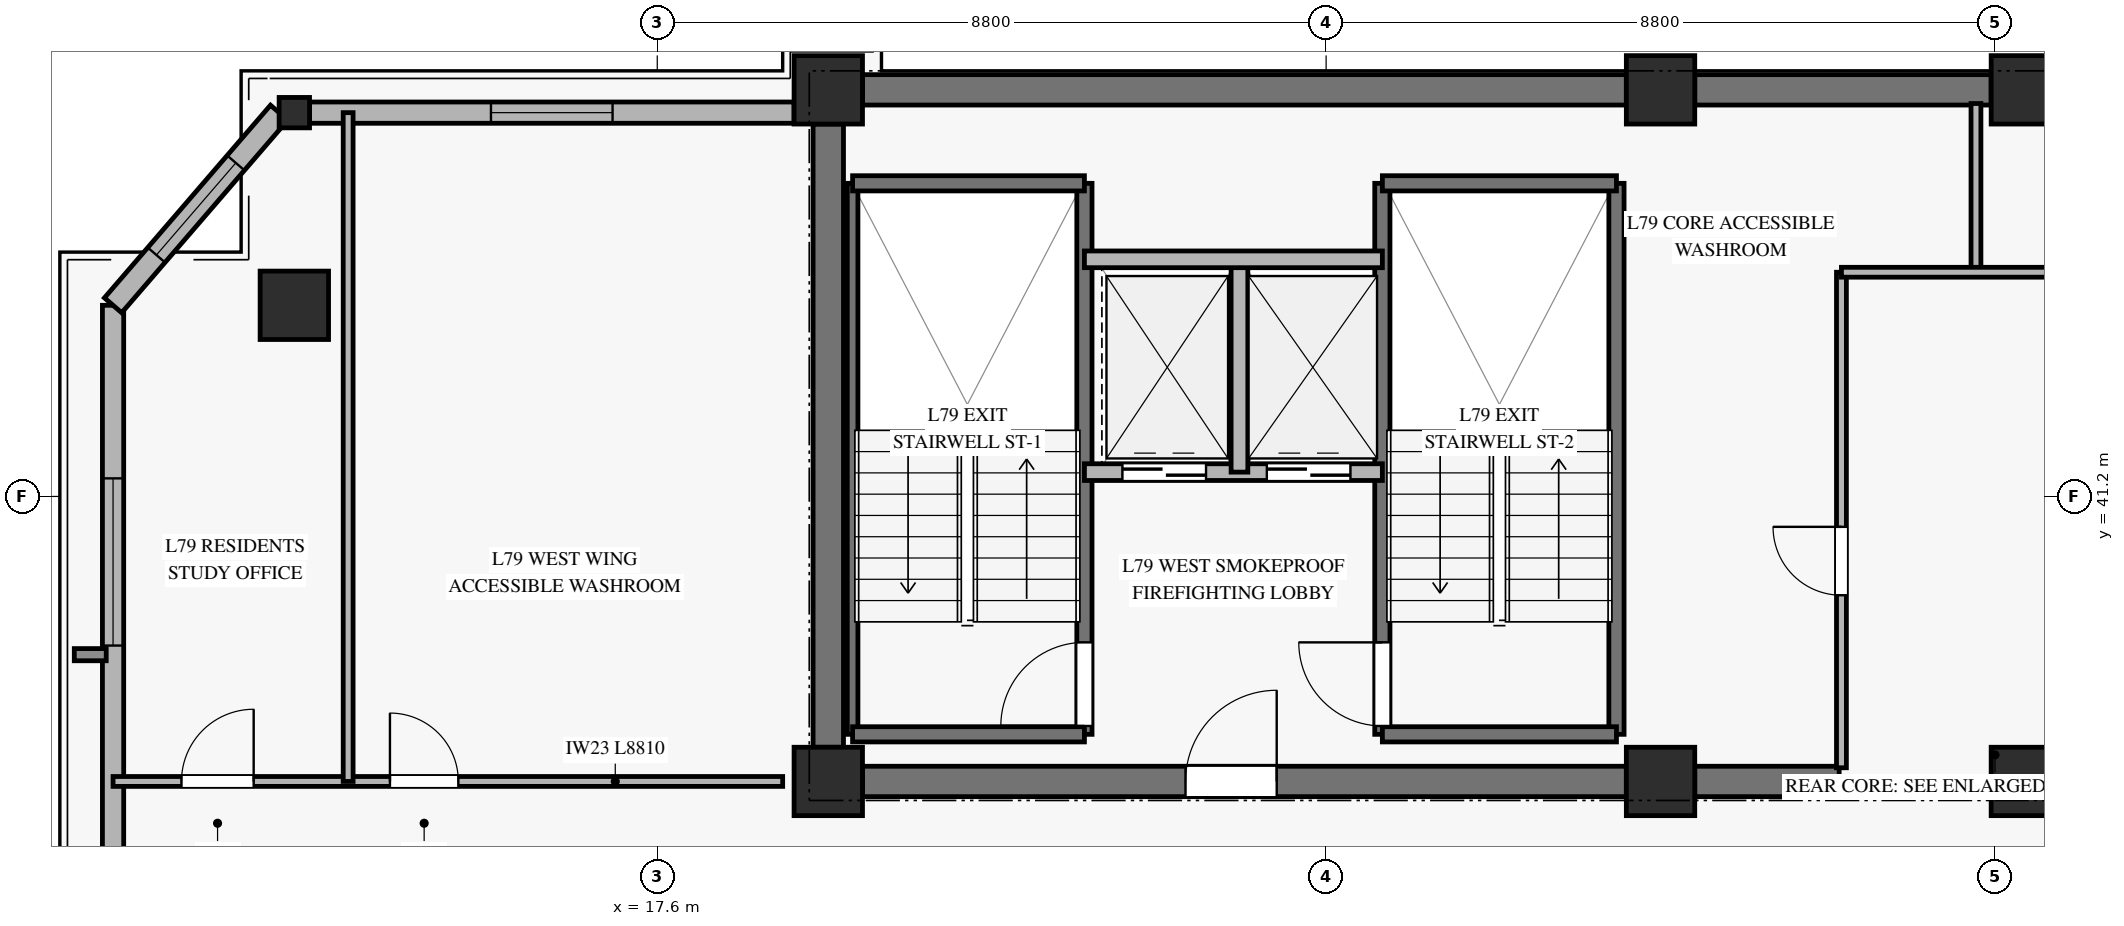
"""IFC4 building model, lengths in metres.
Left out: names, types, materials, properties, quantities, classifications, styles, units other than length and angle.
Written with IfcOpenShell. Run it as: python <this file> out.ifc"""

import sys

from ifc_helpers import new_model, si_unit, direction, frame, frame_2d, origin, origin_2d, place, context, subcontext, project, spatial, rectangle, hollow_rectangle, extrude, source, transform, mapped, element, fill, save


model = new_model("IFC4")
c1 = context("Model", 3, precision=1e-05, world=origin(), true_north=direction((0.0, 1.0)))
c2 = subcontext(c1, "Body", "Model", "MODEL_VIEW")
j1 = project(units=[si_unit("LENGTHUNIT", "METRE"), si_unit("PLANEANGLEUNIT", "RADIAN")], contexts=[c1])
p1 = place(None, origin())
s1 = spatial("IfcSite", under=j1, at=p1, CompositionType="ELEMENT")
p2 = place(p1, origin())
s2 = spatial("IfcBuilding", under=s1, at=p2, CompositionType="ELEMENT")
p3 = place(p2, frame((0.0, 0.0, 307.4)))
s3 = spatial("IfcBuildingStorey", under=s2, at=p3, CompositionType="ELEMENT", Elevation=307.4)
m1 = source(origin(), c2, "Body", "SweptSolid", [
    extrude(rectangle(XDim=0.9, YDim=0.9, at=origin_2d()), origin(), (0.0, 0.0, 1.0), 3.185),
])
for number, where, z_axis, x_axis in (
    (1, (19.85, 37.45, 0.0), (0.0, 0.0, 1.0), (1.0, 0.0, 0.0)),
    (2, (19.85, 46.55, 0.0), (0.0, 0.0, 1.0), (1.0, 0.0, 0.0)),
    (3, (30.8, 37.45, 0.0), (0.0, 0.0, 1.0), (1.0, 0.0, 0.0)),
    (4, (30.8, 46.55, 0.0), (0.0, 0.0, 1.0), (1.0, 0.0, 0.0)),
    (5, (35.6, 37.45, 0.0), (0.0, 0.0, 1.0), (1.0, 0.0, 0.0)),
    (6, (35.6, 46.55, 0.0), (0.0, 0.0, 1.0), (1.0, 0.0, 0.0)),
):
    element("IfcColumn", number, at=place(p3, frame(where, z_axis=z_axis, x_axis=x_axis)), inside=s3, PredefinedType="PILASTER", context=c2, shape_type="MappedRepresentation", body=[
        mapped(m1, transform((0.0, 0.0, 0.0), x_axis=(1.0, 0.0, 0.0), y_axis=(0.0, 1.0, 0.0), z_axis=(0.0, 0.0, 1.0), scale=1.0)),
    ])
p4 = place(p3, frame((20.3, 46.55, 0.0), z_axis=(0.0, 0.0, 1.0), x_axis=(1.0, 0.0, 0.0)))
e7 = element("IfcWall", 7, at=p4, inside=s3, PredefinedType="SHEAR", context=c2, shape_type="SweptSolid", body=[
    extrude(rectangle(XDim=10.05, YDim=0.4, at=frame_2d((5.025, 0.0))), origin(), (0.0, 0.0, 1.0), 3.185),
])
p5 = place(p3, frame((31.25, 46.55, 0.0), z_axis=(0.0, 0.0, 1.0), x_axis=(1.0, 0.0, 0.0)))
e8 = element("IfcWall", 8, at=p5, inside=s3, PredefinedType="SHEAR", context=c2, shape_type="SweptSolid", body=[
    extrude(rectangle(XDim=3.9, YDim=0.4, at=frame_2d((1.95, 0.0))), origin(), (0.0, 0.0, 1.0), 3.185),
])
p6 = place(p3, frame((20.3, 37.45, 0.0), z_axis=(0.0, 0.0, 1.0), x_axis=(1.0, 0.0, 0.0)))
e9 = element("IfcWall", 9, at=p6, inside=s3, PredefinedType="SHEAR", context=c2, shape_type="SweptSolid", body=[
    extrude(rectangle(XDim=10.05, YDim=0.4, at=frame_2d((5.025, 0.0))), origin(), (0.0, 0.0, 1.0), 3.185),
])
p7 = place(p6, frame((4.25, 0.0, 0.0)))
e10 = element("IfcOpeningElement", 10, at=p7, cuts=e9, PredefinedType="OPENING", context=c2, shape_type="SweptSolid", body=[
    extrude(rectangle(XDim=1.2, YDim=2.15, at=frame_2d((0.6, 1.075))), frame((0.0, 0.21, 0.0), z_axis=(0.0, -1.0, 0.0), x_axis=(1.0, 0.0, 0.0)), (0.0, 0.0, 1.0), 0.42),
])
p8 = place(p3, frame((31.25, 37.45, 0.0), z_axis=(0.0, 0.0, 1.0), x_axis=(1.0, 0.0, 0.0)))
e11 = element("IfcWall", 11, at=p8, inside=s3, PredefinedType="SHEAR", context=c2, shape_type="SweptSolid", body=[
    extrude(rectangle(XDim=1.9, YDim=0.4, at=frame_2d((0.95, 0.0))), origin(), (0.0, 0.0, 1.0), 3.185),
])
p9 = place(p3, frame((19.85, 37.9, 0.0), z_axis=(0.0, 0.0, 1.0), x_axis=(0.0, 1.0, 0.0)))
e12 = element("IfcWall", 12, at=p9, inside=s3, PredefinedType="SHEAR", context=c2, shape_type="SweptSolid", body=[
    extrude(rectangle(XDim=8.2, YDim=0.4, at=frame_2d((4.1, 0.0))), origin(), (0.0, 0.0, 1.0), 3.185),
])
m2 = source(origin(), c2, "Body", "SweptSolid", [
    extrude(hollow_rectangle(XDim=0.9, YDim=0.9, WallThickness=0.04, at=origin_2d()), origin(), (0.0, 0.0, 1.0), 3.185),
])
p10 = place(p3, frame((12.825, 43.715, 0.0), z_axis=(0.0, 0.0, 1.0), x_axis=(1.0, 0.0, 0.0)))
e13 = element("IfcColumn", 13, at=p10, inside=s3, PredefinedType="COLUMN", context=c2, shape_type="MappedRepresentation", body=[
    mapped(m2, transform((0.0, 0.0, 0.0), x_axis=(1.0, 0.0, 0.0), y_axis=(0.0, 1.0, 0.0), z_axis=(0.0, 0.0, 1.0), scale=1.0)),
])
m3 = source(origin(), c2, "Body", "SweptSolid", [
    extrude(hollow_rectangle(XDim=0.4, YDim=0.4, WallThickness=0.02, at=origin_2d()), origin(), (0.0, 0.0, 1.0), 3.185),
])
p11 = place(p3, frame((12.825, 46.25, 0.0), z_axis=(0.0, 0.0, 1.0), x_axis=(1.0, 0.0, 0.0)))
e14 = element("IfcColumn", 14, at=p11, inside=s3, PredefinedType="COLUMN", context=c2, shape_type="MappedRepresentation", body=[
    mapped(m3, transform((0.0, 0.0, 0.0), x_axis=(1.0, 0.0, 0.0), y_axis=(0.0, 1.0, 0.0), z_axis=(0.0, 0.0, 1.0), scale=1.0)),
])
p12 = place(p3, frame((10.44, 33.136, 0.0), z_axis=(0.0, 0.0, 1.0), x_axis=(0.0, 1.0, 0.0)))
e15 = element("IfcWall", 15, at=p12, inside=s3, PredefinedType="SOLIDWALL", context=c2, shape_type="SweptSolid", body=[
    extrude(rectangle(XDim=10.579, YDim=0.28, at=frame_2d((5.29, 0.0))), origin(), (0.0, 0.0, 1.0), 2.815),
])
p13 = place(p12, frame((6.102, 0.0, 0.45)))
e16 = element("IfcOpeningElement", 16, at=p13, cuts=e15, PredefinedType="OPENING", context=c2, shape_type="SweptSolid", body=[
    extrude(rectangle(XDim=2.2, YDim=2.1, at=frame_2d((1.1, 1.05))), frame((0.0, 0.15, 0.0), z_axis=(0.0, -1.0, 0.0), x_axis=(1.0, 0.0, 0.0)), (0.0, 0.0, 1.0), 0.3),
])
p14 = place(p3, frame((13.025, 46.25, 0.0), z_axis=(0.0, 0.0, 1.0), x_axis=(1.0, 0.0, 0.0)))
e17 = element("IfcWall", 17, at=p14, inside=s3, PredefinedType="SOLIDWALL", context=c2, shape_type="SweptSolid", body=[
    extrude(rectangle(XDim=6.375, YDim=0.28, at=frame_2d((3.188, 0.0))), origin(), (0.0, 0.0, 1.0), 2.815),
])
p15 = place(p14, frame((2.387, 0.0, 0.45)))
e18 = element("IfcOpeningElement", 18, at=p15, cuts=e17, PredefinedType="OPENING", context=c2, shape_type="SweptSolid", body=[
    extrude(rectangle(XDim=1.6, YDim=2.0, at=frame_2d((0.8, 1.0))), frame((0.0, 0.15, 0.0), z_axis=(0.0, -1.0, 0.0), x_axis=(1.0, 0.0, 0.0)), (0.0, 0.0, 1.0), 0.3),
])
p16 = place(p3, frame((12.625, 46.25, 0.0), z_axis=(0.0, 0.0, 1.0), x_axis=(-0.652903544361, -0.757441061576, 0.0)))
e19 = element("IfcWall", 19, at=p16, inside=s3, PredefinedType="SOLIDWALL", context=c2, shape_type="SweptSolid", body=[
    extrude(rectangle(XDim=3.347, YDim=0.3, at=frame_2d((1.673, 0.0))), origin(), (0.0, 0.0, 1.0), 2.815),
])
p17 = place(p16, frame((0.873, 0.0, 0.45)))
e20 = element("IfcOpeningElement", 20, at=p17, cuts=e19, PredefinedType="OPENING", context=c2, shape_type="SweptSolid", body=[
    extrude(rectangle(XDim=1.6, YDim=2.0, at=frame_2d((0.8, 1.0))), frame((0.0, 0.16, 0.0), z_axis=(0.0, -1.0, 0.0), x_axis=(1.0, 0.0, 0.0)), (0.0, 0.0, 1.0), 0.32),
])
p18 = place(p3, frame((20.17, 38.07, 0.0), z_axis=(0.0, 0.0, 1.0), x_axis=(0.0, 1.0, 0.0)))
e21 = element("IfcWall", 21, at=p18, inside=s3, PredefinedType="SOLIDWALL", context=c2, shape_type="SweptSolid", body=[
    extrude(rectangle(XDim=7.25, YDim=0.14, at=frame_2d((3.625, 0.0))), origin(), (0.0, 0.0, 1.0), 3.4),
])
p19 = place(p3, frame((23.22, 38.07, 0.0), z_axis=(0.0, 0.0, 1.0), x_axis=(0.0, 1.0, 0.0)))
e22 = element("IfcWall", 22, at=p19, inside=s3, PredefinedType="SOLIDWALL", context=c2, shape_type="SweptSolid", body=[
    extrude(rectangle(XDim=7.25, YDim=0.2, at=frame_2d((3.625, 0.0))), origin(), (0.0, 0.0, 1.0), 3.4),
])
p20 = place(p19, frame((0.11, 0.0, 0.0)))
e23 = element("IfcOpeningElement", 23, at=p20, cuts=e22, PredefinedType="OPENING", context=c2, shape_type="SweptSolid", body=[
    extrude(rectangle(XDim=1.1, YDim=2.15, at=frame_2d((0.55, 1.075))), frame((0.0, 0.11, 0.0), z_axis=(0.0, -1.0, 0.0), x_axis=(1.0, 0.0, 0.0)), (0.0, 0.0, 1.0), 0.22),
])
for number, where, z_axis, x_axis in (
    (24, (20.17, 45.32, 0.0), (0.0, 0.0, 1.0), (1.0, 0.0, 0.0)),
    (25, (20.17, 38.07, 0.0), (0.0, 0.0, 1.0), (1.0, 0.0, 0.0)),
):
    element("IfcWall", number, at=place(p3, frame(where, z_axis=z_axis, x_axis=x_axis)), inside=s3, PredefinedType="SOLIDWALL", context=c2, shape_type="SweptSolid", body=[
        extrude(rectangle(XDim=3.05, YDim=0.2, at=frame_2d((1.525, 0.0))), origin(), (0.0, 0.0, 1.0), 3.4),
    ])
p21 = place(p3, frame((27.14, 38.07, 0.0), z_axis=(0.0, 0.0, 1.0), x_axis=(0.0, 1.0, 0.0)))
e26 = element("IfcWall", 26, at=p21, inside=s3, PredefinedType="SOLIDWALL", context=c2, shape_type="SweptSolid", body=[
    extrude(rectangle(XDim=7.25, YDim=0.2, at=frame_2d((3.625, 0.0))), origin(), (0.0, 0.0, 1.0), 3.4),
])
p22 = place(p21, frame((0.11, 0.0, 0.0)))
e27 = element("IfcOpeningElement", 27, at=p22, cuts=e26, PredefinedType="OPENING", context=c2, shape_type="SweptSolid", body=[
    extrude(rectangle(XDim=1.1, YDim=2.15, at=frame_2d((0.55, 1.075))), frame((0.0, 0.11, 0.0), z_axis=(0.0, -1.0, 0.0), x_axis=(1.0, 0.0, 0.0)), (0.0, 0.0, 1.0), 0.22),
])
p23 = place(p3, frame((30.22, 38.07, 0.0), z_axis=(0.0, 0.0, 1.0), x_axis=(0.0, 1.0, 0.0)))
e28 = element("IfcWall", 28, at=p23, inside=s3, PredefinedType="SOLIDWALL", context=c2, shape_type="SweptSolid", body=[
    extrude(rectangle(XDim=7.25, YDim=0.2, at=frame_2d((3.625, 0.0))), origin(), (0.0, 0.0, 1.0), 3.4),
])
for number, where, z_axis, x_axis in (
    (29, (27.14, 45.32, 0.0), (0.0, 0.0, 1.0), (1.0, 0.0, 0.0)),
    (30, (27.14, 38.07, 0.0), (0.0, 0.0, 1.0), (1.0, 0.0, 0.0)),
):
    element("IfcWall", number, at=place(p3, frame(where, z_axis=z_axis, x_axis=x_axis)), inside=s3, PredefinedType="SOLIDWALL", context=c2, shape_type="SweptSolid", body=[
        extrude(rectangle(XDim=3.08, YDim=0.2, at=frame_2d((1.54, 0.0))), origin(), (0.0, 0.0, 1.0), 3.4),
    ])
p24 = place(p3, frame((23.22, 41.52, 0.0), z_axis=(0.0, 0.0, 1.0), x_axis=(1.0, 0.0, 0.0)))
e31 = element("IfcWall", 31, at=p24, inside=s3, PredefinedType="SOLIDWALL", context=c2, shape_type="SweptSolid", body=[
    extrude(rectangle(XDim=3.92, YDim=0.22, at=frame_2d((1.96, 0.0))), origin(), (0.0, 0.0, 1.0), 3.185),
])
p25 = place(p24, frame((0.5, 0.0, 0.0)))
e32 = element("IfcOpeningElement", 32, at=p25, cuts=e31, PredefinedType="OPENING", context=c2, shape_type="SweptSolid", body=[
    extrude(rectangle(XDim=1.1, YDim=2.2, at=frame_2d((0.55, 1.1))), frame((0.0, 0.12, 0.0), z_axis=(0.0, -1.0, 0.0), x_axis=(1.0, 0.0, 0.0)), (0.0, 0.0, 1.0), 0.24),
])
p26 = place(p24, frame((2.4, 0.0, 0.0)))
e33 = element("IfcOpeningElement", 33, at=p26, cuts=e31, PredefinedType="OPENING", context=c2, shape_type="SweptSolid", body=[
    extrude(rectangle(XDim=1.1, YDim=2.2, at=frame_2d((0.55, 1.1))), frame((0.0, 0.12, 0.0), z_axis=(0.0, -1.0, 0.0), x_axis=(1.0, 0.0, 0.0)), (0.0, 0.0, 1.0), 0.24),
])
p27 = place(p3, frame((25.26, 41.52, 0.0), z_axis=(0.0, 0.0, 1.0), x_axis=(0.0, 1.0, 0.0)))
e34 = element("IfcWall", 34, at=p27, inside=s3, PredefinedType="SOLIDWALL", context=c2, shape_type="SweptSolid", body=[
    extrude(rectangle(XDim=2.8, YDim=0.22, at=frame_2d((1.4, 0.0))), origin(), (0.0, 0.0, 1.0), 3.185),
])
p28 = place(p3, frame((23.22, 44.32, 0.0), z_axis=(0.0, 0.0, 1.0), x_axis=(1.0, 0.0, 0.0)))
e35 = element("IfcWall", 35, at=p28, inside=s3, PredefinedType="SOLIDWALL", context=c2, shape_type="SweptSolid", body=[
    extrude(rectangle(XDim=3.92, YDim=0.22, at=frame_2d((1.96, 0.0))), origin(), (0.0, 0.0, 1.0), 3.185),
])
p29 = place(p3, frame((33.18, 37.63, 0.0), z_axis=(0.0, 0.0, 1.0), x_axis=(0.0, 1.0, 0.0)))
e36 = element("IfcWall", 36, at=p29, inside=s3, PredefinedType="PARTITIONING", context=c2, shape_type="SweptSolid", body=[
    extrude(rectangle(XDim=6.52, YDim=0.13, at=frame_2d((3.26, 0.0))), origin(), (0.0, 0.0, 1.0), 2.27),
])
p30 = place(p29, frame((2.27, 0.0, 0.0)))
e37 = element("IfcOpeningElement", 37, at=p30, cuts=e36, PredefinedType="OPENING", context=c2, shape_type="SweptSolid", body=[
    extrude(rectangle(XDim=0.9, YDim=2.1, at=frame_2d((0.45, 1.05))), frame((0.0, 0.075, 0.0), z_axis=(0.0, -1.0, 0.0), x_axis=(1.0, 0.0, 0.0)), (0.0, 0.0, 1.0), 0.15),
])
p31 = place(p3, frame((34.95, 44.15, 0.0), z_axis=(0.0, 0.0, 1.0), x_axis=(0.0, 1.0, 0.0)))
e38 = element("IfcWall", 38, at=p31, inside=s3, PredefinedType="PARTITIONING", context=c2, shape_type="SweptSolid", body=[
    extrude(rectangle(XDim=2.22, YDim=0.13, at=frame_2d((1.11, 0.0))), origin(), (0.0, 0.0, 1.0), 3.185),
])
p32 = place(p3, frame((33.18, 44.15, 0.0), z_axis=(0.0, 0.0, 1.0), x_axis=(1.0, 0.0, 0.0)))
e39 = element("IfcWall", 39, at=p32, inside=s3, PredefinedType="PARTITIONING", context=c2, shape_type="SweptSolid", body=[
    extrude(rectangle(XDim=2.94, YDim=0.13, at=frame_2d((1.47, 0.0))), origin(), (0.0, 0.0, 1.0), 2.47),
])
p33 = place(p3, frame((10.44, 37.45, 0.0), z_axis=(0.0, 0.0, 1.0), x_axis=(1.0, 0.0, 0.0)))
e40 = element("IfcWall", 40, at=p33, inside=s3, PredefinedType="PARTITIONING", context=c2, shape_type="SweptSolid", body=[
    extrude(rectangle(XDim=8.81, YDim=0.13, at=frame_2d((4.405, 0.0))), origin(), (0.0, 0.0, 1.0), 2.82),
])
p34 = place(p33, frame((0.9, 0.0, 0.0)))
e41 = element("IfcOpeningElement", 41, at=p34, cuts=e40, PredefinedType="OPENING", context=c2, shape_type="SweptSolid", body=[
    extrude(rectangle(XDim=0.95, YDim=2.1, at=frame_2d((0.475, 1.05))), frame((0.0, 0.075, 0.0), z_axis=(0.0, -1.0, 0.0), x_axis=(1.0, 0.0, 0.0)), (0.0, 0.0, 1.0), 0.15),
])
p35 = place(p33, frame((3.643, 0.0, 0.0)))
e42 = element("IfcOpeningElement", 42, at=p35, cuts=e40, PredefinedType="OPENING", context=c2, shape_type="SweptSolid", body=[
    extrude(rectangle(XDim=0.9, YDim=2.1, at=frame_2d((0.45, 1.05))), frame((0.0, 0.075, 0.0), z_axis=(0.0, -1.0, 0.0), x_axis=(1.0, 0.0, 0.0)), (0.0, 0.0, 1.0), 0.15),
])
p36 = place(p3, frame((13.533, 37.45, 0.0), z_axis=(0.0, 0.0, 1.0), x_axis=(0.0, 1.0, 0.0)))
e43 = element("IfcWall", 43, at=p36, inside=s3, PredefinedType="PARTITIONING", context=c2, shape_type="SweptSolid", body=[
    extrude(rectangle(XDim=8.8, YDim=0.13, at=frame_2d((4.4, 0.0))), origin(), (0.0, 0.0, 1.0), 3.185),
])
m4 = source(origin(), c2, "Body", "SweptSolid", [
    extrude(rectangle(XDim=2.2, YDim=2.1, at=frame_2d((1.1, 1.05))), frame((0.0, 0.03, 0.0), z_axis=(0.0, -1.0, 0.0), x_axis=(1.0, 0.0, 0.0)), (0.0, 0.0, 1.0), 0.06),
])
p37 = place(p13, origin())
e44 = element("IfcWindow", 44, at=p37, inside=s3, PartitioningType="SINGLE_PANEL", PredefinedType="WINDOW", context=c2, shape_type="MappedRepresentation", body=[
    mapped(m4, transform((0.0, 0.0, 0.0), x_axis=(1.0, 0.0, 0.0), y_axis=(0.0, 1.0, 0.0), z_axis=(0.0, 0.0, 1.0), scale=1.0)),
])
fill(e16, e44)
m5 = source(origin(), c2, "Body", "SweptSolid", [
    extrude(rectangle(XDim=1.6, YDim=2.0, at=frame_2d((0.8, 1.0))), frame((0.0, 0.03, 0.0), z_axis=(0.0, -1.0, 0.0), x_axis=(1.0, 0.0, 0.0)), (0.0, 0.0, 1.0), 0.06),
])
p38 = place(p15, origin())
e45 = element("IfcWindow", 45, at=p38, inside=s3, PartitioningType="SINGLE_PANEL", PredefinedType="WINDOW", context=c2, shape_type="MappedRepresentation", body=[
    mapped(m5, transform((0.0, 0.0, 0.0), x_axis=(1.0, 0.0, 0.0), y_axis=(0.0, 1.0, 0.0), z_axis=(0.0, 0.0, 1.0), scale=1.0)),
])
fill(e18, e45)
p39 = place(p17, origin())
e46 = element("IfcWindow", 46, at=p39, inside=s3, PartitioningType="SINGLE_PANEL", PredefinedType="WINDOW", context=c2, shape_type="MappedRepresentation", body=[
    mapped(m5, transform((0.0, 0.0, 0.0), x_axis=(1.0, 0.0, 0.0), y_axis=(0.0, 1.0, 0.0), z_axis=(0.0, 0.0, 1.0), scale=1.0)),
])
fill(e20, e46)
m6 = source(origin(), c2, "Body", "SweptSolid", [
    extrude(rectangle(XDim=1.1, YDim=2.15, at=frame_2d((0.55, 1.075))), frame((0.0, 0.025, 0.0), z_axis=(0.0, -1.0, 0.0), x_axis=(1.0, 0.0, 0.0)), (0.0, 0.0, 1.0), 0.05),
])
p40 = place(p20, origin())
e47 = element("IfcDoor", 47, at=p40, inside=s3, OperationType="SINGLE_SWING_LEFT", PredefinedType="DOOR", context=c2, shape_type="MappedRepresentation", body=[
    mapped(m6, transform((0.0, 0.0, 0.0), x_axis=(1.0, 0.0, 0.0), y_axis=(0.0, 1.0, 0.0), z_axis=(0.0, 0.0, 1.0), scale=1.0)),
])
fill(e23, e47)
p41 = place(p22, origin())
e48 = element("IfcDoor", 48, at=p41, inside=s3, OperationType="SINGLE_SWING_RIGHT", PredefinedType="DOOR", context=c2, shape_type="MappedRepresentation", body=[
    mapped(m6, transform((0.0, 0.0, 0.0), x_axis=(1.0, 0.0, 0.0), y_axis=(0.0, 1.0, 0.0), z_axis=(0.0, 0.0, 1.0), scale=1.0)),
])
fill(e27, e48)
m7 = source(origin(), c2, "Body", "SweptSolid", [
    extrude(rectangle(XDim=1.1, YDim=2.2, at=frame_2d((0.55, 1.1))), frame((0.0, 0.025, 0.0), z_axis=(0.0, -1.0, 0.0), x_axis=(1.0, 0.0, 0.0)), (0.0, 0.0, 1.0), 0.05),
])
p42 = place(p25, origin())
e49 = element("IfcDoor", 49, at=p42, inside=s3, OperationType="SLIDING_TO_LEFT", PredefinedType="DOOR", context=c2, shape_type="MappedRepresentation", body=[
    mapped(m7, transform((0.0, 0.0, 0.0), x_axis=(1.0, 0.0, 0.0), y_axis=(0.0, 1.0, 0.0), z_axis=(0.0, 0.0, 1.0), scale=1.0)),
])
fill(e32, e49)
p43 = place(p26, origin())
e50 = element("IfcDoor", 50, at=p43, inside=s3, OperationType="SLIDING_TO_LEFT", PredefinedType="DOOR", context=c2, shape_type="MappedRepresentation", body=[
    mapped(m7, transform((0.0, 0.0, 0.0), x_axis=(1.0, 0.0, 0.0), y_axis=(0.0, 1.0, 0.0), z_axis=(0.0, 0.0, 1.0), scale=1.0)),
])
fill(e33, e50)
m8 = source(origin(), c2, "Body", "SweptSolid", [
    extrude(rectangle(XDim=1.2, YDim=2.15, at=frame_2d((0.6, 1.075))), frame((0.0, 0.025, 0.0), z_axis=(0.0, -1.0, 0.0), x_axis=(1.0, 0.0, 0.0)), (0.0, 0.0, 1.0), 0.05),
])
p44 = place(p7, origin())
e51 = element("IfcDoor", 51, at=p44, inside=s3, OperationType="SINGLE_SWING_RIGHT", PredefinedType="DOOR", context=c2, shape_type="MappedRepresentation", body=[
    mapped(m8, transform((0.0, 0.0, 0.0), x_axis=(1.0, 0.0, 0.0), y_axis=(0.0, 1.0, 0.0), z_axis=(0.0, 0.0, 1.0), scale=1.0)),
])
fill(e10, e51)
m9 = source(origin(), c2, "Body", "SweptSolid", [
    extrude(rectangle(XDim=0.9, YDim=2.1, at=frame_2d((0.45, 1.05))), frame((0.0, 0.025, 0.0), z_axis=(0.0, -1.0, 0.0), x_axis=(1.0, 0.0, 0.0)), (0.0, 0.0, 1.0), 0.05),
])
p45 = place(p30, origin())
e52 = element("IfcDoor", 52, at=p45, inside=s3, OperationType="SINGLE_SWING_RIGHT", PredefinedType="DOOR", context=c2, shape_type="MappedRepresentation", body=[
    mapped(m9, transform((0.0, 0.0, 0.0), x_axis=(1.0, 0.0, 0.0), y_axis=(0.0, 1.0, 0.0), z_axis=(0.0, 0.0, 1.0), scale=1.0)),
])
fill(e37, e52)
m10 = source(origin(), c2, "Body", "SweptSolid", [
    extrude(rectangle(XDim=0.95, YDim=2.1, at=frame_2d((0.475, 1.05))), frame((0.0, 0.025, 0.0), z_axis=(0.0, -1.0, 0.0), x_axis=(1.0, 0.0, 0.0)), (0.0, 0.0, 1.0), 0.05),
])
p46 = place(p34, origin())
e53 = element("IfcDoor", 53, at=p46, inside=s3, OperationType="SINGLE_SWING_RIGHT", PredefinedType="DOOR", context=c2, shape_type="MappedRepresentation", body=[
    mapped(m10, transform((0.0, 0.0, 0.0), x_axis=(1.0, 0.0, 0.0), y_axis=(0.0, 1.0, 0.0), z_axis=(0.0, 0.0, 1.0), scale=1.0)),
])
fill(e41, e53)
p47 = place(p35, origin())
e54 = element("IfcDoor", 54, at=p47, inside=s3, OperationType="SINGLE_SWING_LEFT", PredefinedType="DOOR", context=c2, shape_type="MappedRepresentation", body=[
    mapped(m9, transform((0.0, 0.0, 0.0), x_axis=(1.0, 0.0, 0.0), y_axis=(0.0, 1.0, 0.0), z_axis=(0.0, 0.0, 1.0), scale=1.0)),
])
fill(e42, e54)
save(model, sys.argv[1])
